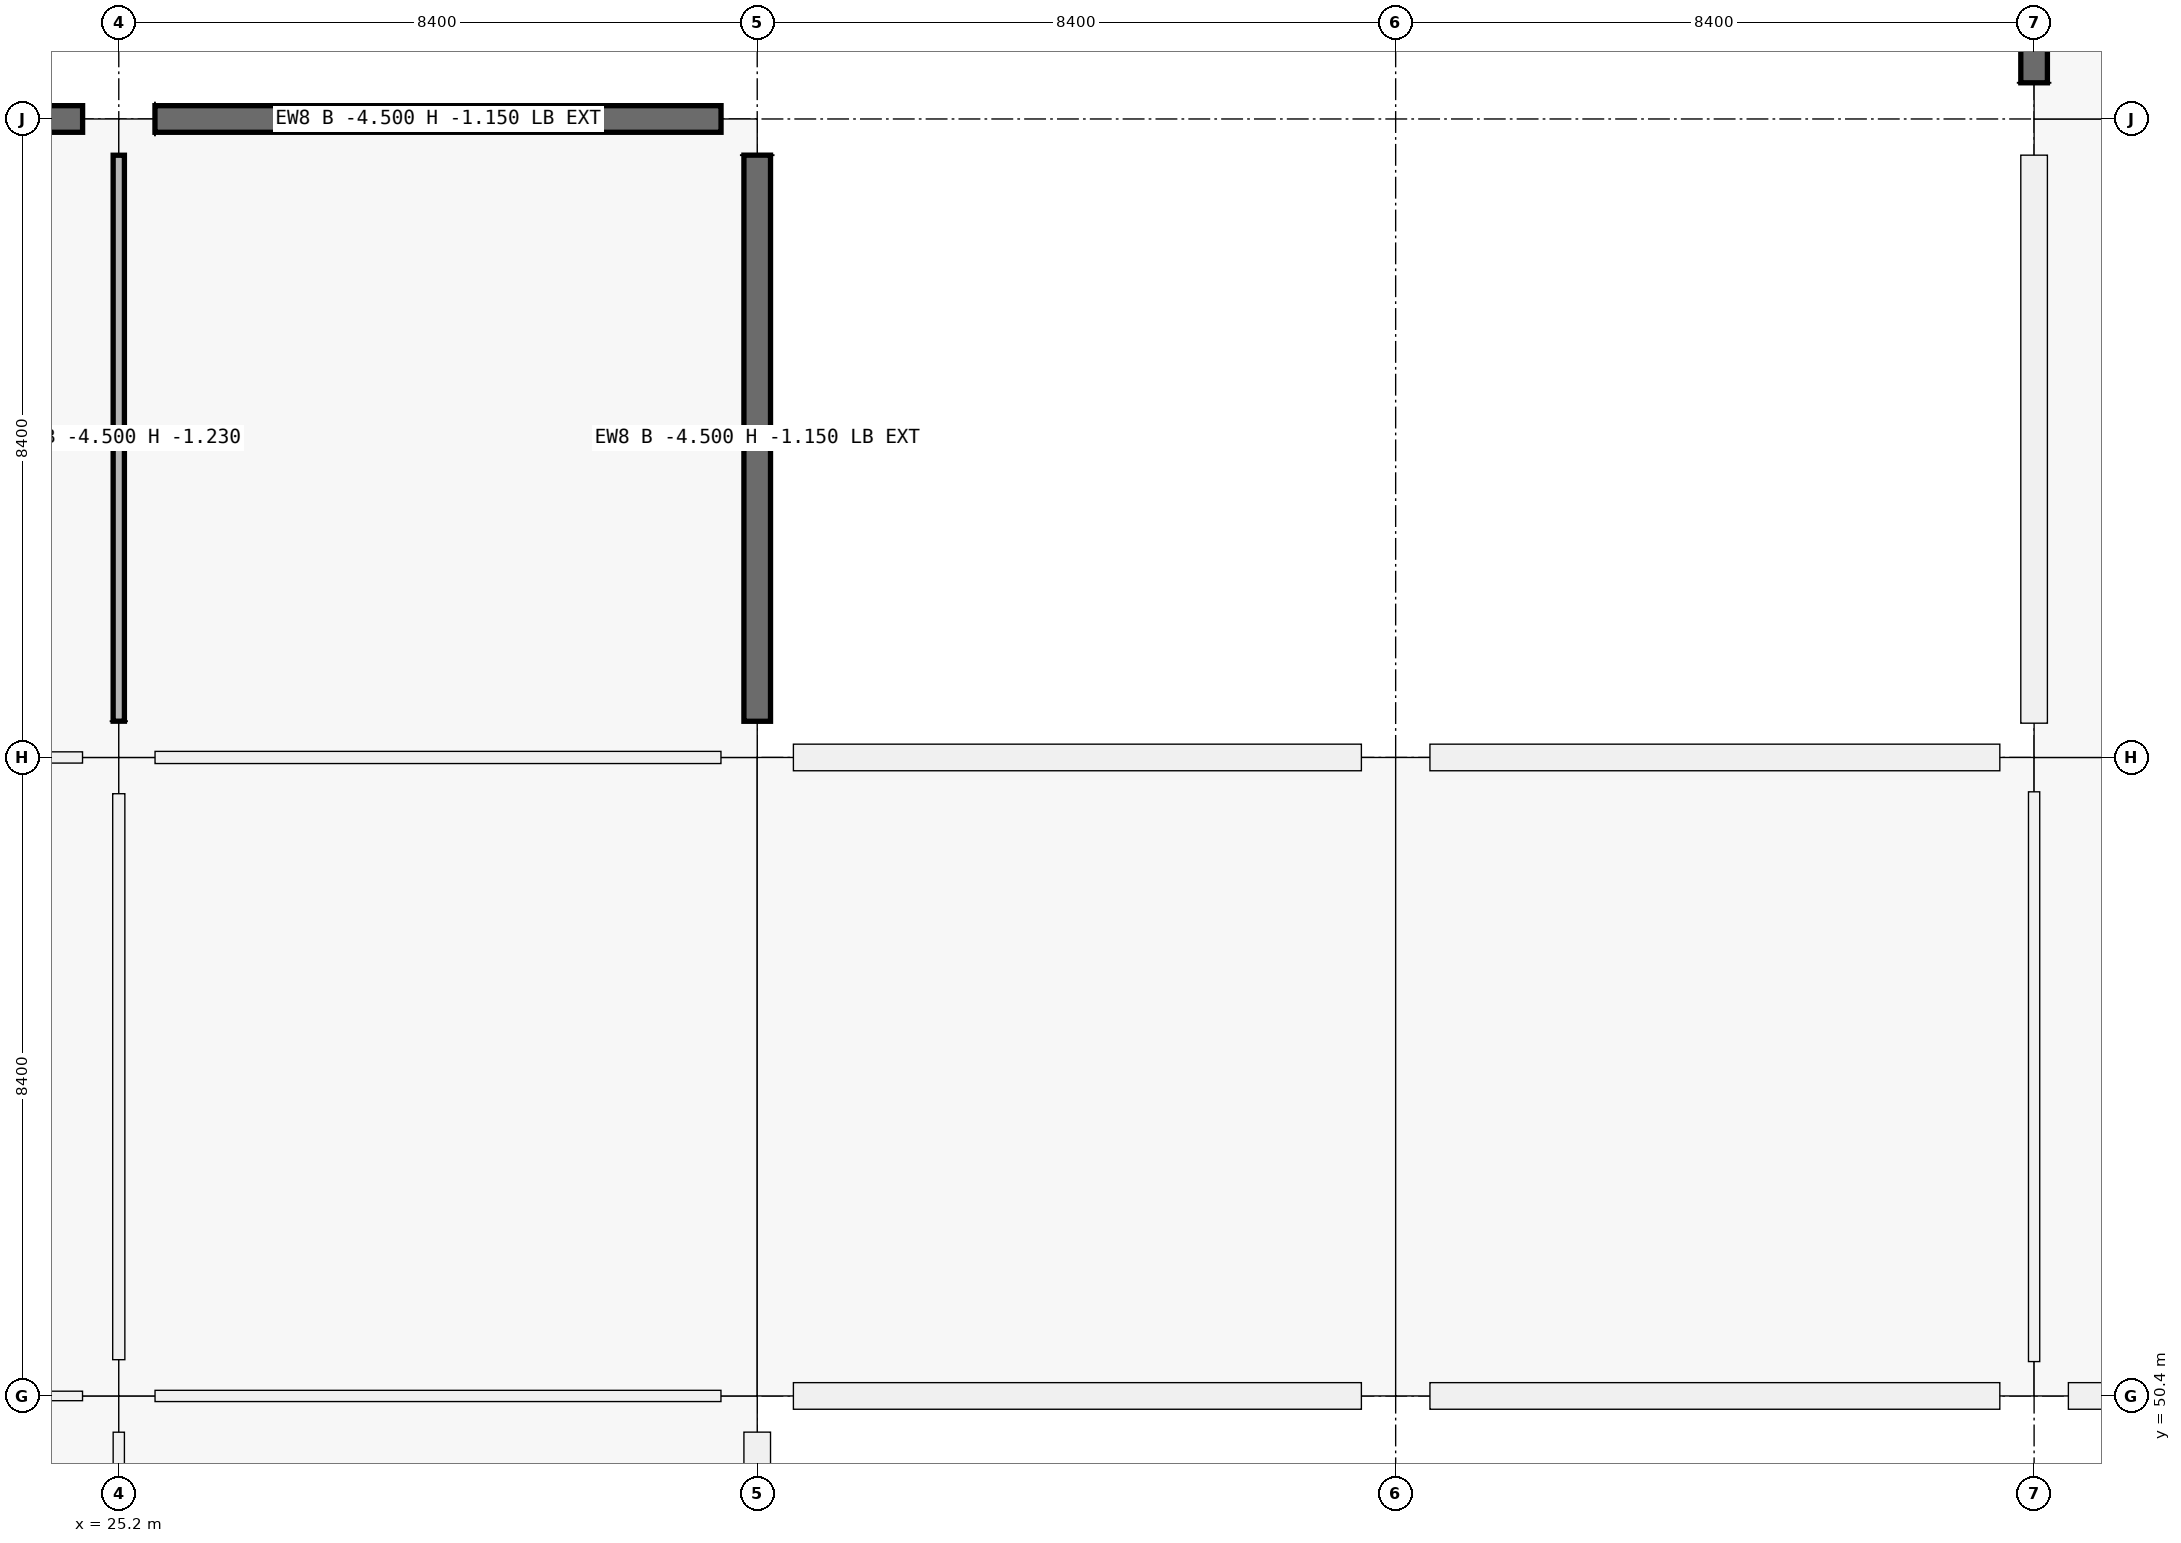
"""IFC4 building model, lengths in metres.
Left out: names, types, materials, properties, quantities, classifications, styles, units other than length and angle.
Written with IfcOpenShell. Run it as: python <this file> out.ifc"""

import sys

from ifc_helpers import new_model, si_unit, direction, frame, frame_2d, origin, origin_2d, place, context, subcontext, project, spatial, rectangle, extrude, element, fill, save


model = new_model("IFC4")
c1 = context("Model", 3, precision=1e-05, world=origin(), true_north=direction((0.0, 1.0)))
c2 = subcontext(c1, "Body", "Model", "MODEL_VIEW")
j1 = project(units=[si_unit("LENGTHUNIT", "METRE"), si_unit("PLANEANGLEUNIT", "RADIAN")], contexts=[c1])
p1 = place(None, origin())
s1 = spatial("IfcSite", under=j1, at=p1, CompositionType="ELEMENT")
p2 = place(p1, origin())
s2 = spatial("IfcBuilding", under=s1, at=p2, CompositionType="ELEMENT")
p3 = place(p2, frame((0.0, 0.0, -4.5)))
s3 = spatial("IfcBuildingStorey", under=s2, at=p3, CompositionType="ELEMENT", Elevation=-4.5)
for number, where, z_axis, x_axis in (
    (1, (25.2, 50.4, -0.35), (0.0, 0.0, 1.0), (1.0, 0.0, 0.0)),
    (2, (25.2, 58.8, -0.35), (0.0, 0.0, 1.0), (1.0, 0.0, 0.0)),
    (3, (25.2, 67.2, -0.35), (0.0, 0.0, 1.0), (1.0, 0.0, 0.0)),
    (4, (33.6, 50.4, -0.35), (0.0, 0.0, 1.0), (1.0, 0.0, 0.0)),
    (5, (33.6, 58.8, -0.35), (0.0, 0.0, 1.0), (1.0, 0.0, 0.0)),
    (6, (33.6, 67.2, -0.35), (0.0, 0.0, 1.0), (1.0, 0.0, 0.0)),
):
    element("IfcColumn", number, at=place(p3, frame(where, z_axis=z_axis, x_axis=x_axis)), inside=s3, PredefinedType="COLUMN", context=c2, shape_type="SweptSolid", body=[
        extrude(rectangle(XDim=0.95, YDim=0.95, at=origin_2d()), origin(), (0.0, 0.0, 1.0), 4.85),
    ])
for number, where, z_axis, x_axis in (
    (7, (42.0, 50.4, -0.35), (0.0, 0.0, 1.0), (1.0, 0.0, 0.0)),
    (8, (42.0, 58.8, -0.35), (0.0, 0.0, 1.0), (1.0, 0.0, 0.0)),
):
    element("IfcColumn", number, at=place(p3, frame(where, z_axis=z_axis, x_axis=x_axis)), inside=s3, PredefinedType="COLUMN", context=c2, shape_type="SweptSolid", body=[
        extrude(rectangle(XDim=0.9, YDim=0.9, at=origin_2d()), origin(), (0.0, 0.0, 1.0), 4.85),
    ])
p4 = place(p3, frame((42.0, 67.2, -0.35), z_axis=(0.0, 0.0, 1.0), x_axis=(1.0, 0.0, 0.0)))
e9 = element("IfcColumn", 9, at=p4, inside=s3, PredefinedType="COLUMN", context=c2, shape_type="SweptSolid", body=[
    extrude(rectangle(XDim=0.95, YDim=0.95, at=origin_2d()), origin(), (0.0, 0.0, 1.0), 4.85),
])
for number, where, z_axis, x_axis in (
    (10, (50.4, 50.4, -0.35), (0.0, 0.0, 1.0), (1.0, 0.0, 0.0)),
    (11, (50.4, 58.8, -0.35), (0.0, 0.0, 1.0), (1.0, 0.0, 0.0)),
):
    element("IfcColumn", number, at=place(p3, frame(where, z_axis=z_axis, x_axis=x_axis)), inside=s3, PredefinedType="COLUMN", context=c2, shape_type="SweptSolid", body=[
        extrude(rectangle(XDim=0.9, YDim=0.9, at=origin_2d()), origin(), (0.0, 0.0, 1.0), 4.85),
    ])
p5 = place(p3, frame((50.4, 67.2, -0.35), z_axis=(0.0, 0.0, 1.0), x_axis=(1.0, 0.0, 0.0)))
e12 = element("IfcColumn", 12, at=p5, inside=s3, PredefinedType="COLUMN", context=c2, shape_type="SweptSolid", body=[
    extrude(rectangle(XDim=0.95, YDim=0.95, at=origin_2d()), origin(), (0.0, 0.0, 1.0), 4.85),
])
p6 = place(p3, frame((17.276, 67.2, 0.0), z_axis=(0.0, 0.0, 1.0), x_axis=(1.0, 0.0, 0.0)))
e13 = element("IfcWall", 13, at=p6, inside=s3, PredefinedType="SOLIDWALL", context=c2, shape_type="SweptSolid", body=[
    extrude(rectangle(XDim=7.448, YDim=0.35, at=frame_2d((3.724, 0.0))), origin(), (0.0, 0.0, 1.0), 3.35),
])
for number, where, z_axis, x_axis in (
    (14, (33.6, 49.924, 0.0), (0.0, 0.0, 1.0), (0.0, -1.0, 0.0)),
    (15, (25.676, 67.2, 0.0), (0.0, 0.0, 1.0), (1.0, 0.0, 0.0)),
):
    element("IfcWall", number, at=place(p3, frame(where, z_axis=z_axis, x_axis=x_axis)), inside=s3, PredefinedType="SOLIDWALL", context=c2, shape_type="SweptSolid", body=[
        extrude(rectangle(XDim=7.448, YDim=0.35, at=frame_2d((3.724, 0.0))), origin(), (0.0, 0.0, 1.0), 3.35),
    ])
p7 = place(p3, frame((33.6, 66.724, 0.0), z_axis=(0.0, 0.0, 1.0), x_axis=(0.0, -1.0, 0.0)))
e16 = element("IfcWall", 16, at=p7, inside=s3, PredefinedType="SOLIDWALL", context=c2, shape_type="SweptSolid", body=[
    extrude(rectangle(XDim=7.448, YDim=0.35, at=frame_2d((3.724, 0.0))), origin(), (0.0, 0.0, 1.0), 3.35),
])
for number, where, z_axis, x_axis in (
    (17, (41.549, 50.4, 0.0), (0.0, 0.0, 1.0), (-1.0, 0.0, 0.0)),
    (18, (34.076, 58.8, 0.0), (0.0, 0.0, 1.0), (1.0, 0.0, 0.0)),
):
    element("IfcWall", number, at=place(p3, frame(where, z_axis=z_axis, x_axis=x_axis)), inside=s3, PredefinedType="SOLIDWALL", context=c2, shape_type="SweptSolid", body=[
        extrude(rectangle(XDim=7.473, YDim=0.35, at=frame_2d((3.737, 0.0))), origin(), (0.0, 0.0, 1.0), 3.35),
    ])
for number, where, z_axis, x_axis in (
    (19, (49.949, 50.4, 0.0), (0.0, 0.0, 1.0), (-1.0, 0.0, 0.0)),
    (20, (42.451, 58.8, 0.0), (0.0, 0.0, 1.0), (1.0, 0.0, 0.0)),
    (21, (58.349, 50.4, 0.0), (0.0, 0.0, 1.0), (-1.0, 0.0, 0.0)),
):
    element("IfcWall", number, at=place(p3, frame(where, z_axis=z_axis, x_axis=x_axis)), inside=s3, PredefinedType="SOLIDWALL", context=c2, shape_type="SweptSolid", body=[
        extrude(rectangle(XDim=7.498, YDim=0.35, at=frame_2d((3.749, 0.0))), origin(), (0.0, 0.0, 1.0), 3.35),
    ])
p8 = place(p3, frame((50.4, 59.251, 0.0), z_axis=(0.0, 0.0, 1.0), x_axis=(0.0, 1.0, 0.0)))
e22 = element("IfcWall", 22, at=p8, inside=s3, PredefinedType="SOLIDWALL", context=c2, shape_type="SweptSolid", body=[
    extrude(rectangle(XDim=7.473, YDim=0.35, at=frame_2d((3.737, 0.0))), origin(), (0.0, 0.0, 1.0), 3.35),
])
p9 = place(p3, frame((50.4, 67.676, 0.0), z_axis=(0.0, 0.0, 1.0), x_axis=(0.0, 1.0, 0.0)))
e23 = element("IfcWall", 23, at=p9, inside=s3, PredefinedType="SOLIDWALL", context=c2, shape_type="SweptSolid", body=[
    extrude(rectangle(XDim=7.448, YDim=0.35, at=frame_2d((3.724, 0.0))), origin(), (0.0, 0.0, 1.0), 3.35),
])
p10 = place(p3, frame((17.277, 50.4, 0.0), z_axis=(0.0, 0.0, 1.0), x_axis=(1.0, 0.0, 0.0)))
e24 = element("IfcWall", 24, at=p10, inside=s3, PredefinedType="PARTITIONING", context=c2, shape_type="SweptSolid", body=[
    extrude(rectangle(XDim=7.446, YDim=0.125, at=frame_2d((3.723, 0.0))), origin(), (0.0, 0.0, 1.0), 3.27),
])
p11 = place(p10, frame((0.528, 0.0, 0.0)))
e25 = element("IfcOpeningElement", 25, at=p11, cuts=e24, PredefinedType="OPENING", context=c2, shape_type="SweptSolid", body=[
    extrude(rectangle(XDim=0.92, YDim=2.1, at=frame_2d((0.46, 1.05))), frame((0.0, 0.062, 0.0), z_axis=(0.0, -1.0, 0.0), x_axis=(1.0, 0.0, 0.0)), (0.0, 0.0, 1.0), 0.125),
])
p12 = place(p10, frame((4.418, 0.0, 0.0)))
e26 = element("IfcOpeningElement", 26, at=p12, cuts=e24, PredefinedType="OPENING", context=c2, shape_type="SweptSolid", body=[
    extrude(rectangle(XDim=0.98, YDim=2.08, at=frame_2d((0.49, 1.04))), frame((0.0, 0.062, 0.0), z_axis=(0.0, -1.0, 0.0), x_axis=(1.0, 0.0, 0.0)), (0.0, 0.0, 1.0), 0.125),
])
p13 = place(p3, frame((17.277, 58.8, 0.0), z_axis=(0.0, 0.0, 1.0), x_axis=(1.0, 0.0, 0.0)))
e27 = element("IfcWall", 27, at=p13, inside=s3, PredefinedType="PARTITIONING", context=c2, shape_type="SweptSolid", body=[
    extrude(rectangle(XDim=7.446, YDim=0.148, at=frame_2d((3.723, 0.0))), origin(), (0.0, 0.0, 1.0), 3.27),
])
p14 = place(p13, frame((3.173, 0.0, 0.0)))
e28 = element("IfcOpeningElement", 28, at=p14, cuts=e27, PredefinedType="OPENING", context=c2, shape_type="SweptSolid", body=[
    extrude(rectangle(XDim=1.1, YDim=2.15, at=frame_2d((0.55, 1.075))), frame((0.0, 0.074, 0.0), z_axis=(0.0, -1.0, 0.0), x_axis=(1.0, 0.0, 0.0)), (0.0, 0.0, 1.0), 0.148),
])
p15 = place(p3, frame((25.677, 50.4, 0.0), z_axis=(0.0, 0.0, 1.0), x_axis=(1.0, 0.0, 0.0)))
e29 = element("IfcWall", 29, at=p15, inside=s3, PredefinedType="PARTITIONING", context=c2, shape_type="SweptSolid", body=[
    extrude(rectangle(XDim=7.446, YDim=0.148, at=frame_2d((3.723, 0.0))), origin(), (0.0, 0.0, 1.0), 3.27),
])
p16 = place(p15, frame((3.223, 0.0, 0.0)))
e30 = element("IfcOpeningElement", 30, at=p16, cuts=e29, PredefinedType="OPENING", context=c2, shape_type="SweptSolid", body=[
    extrude(rectangle(XDim=1.0, YDim=2.15, at=frame_2d((0.5, 1.075))), frame((0.0, 0.074, 0.0), z_axis=(0.0, -1.0, 0.0), x_axis=(1.0, 0.0, 0.0)), (0.0, 0.0, 1.0), 0.148),
])
p17 = place(p3, frame((25.677, 58.8, 0.0), z_axis=(0.0, 0.0, 1.0), x_axis=(1.0, 0.0, 0.0)))
e31 = element("IfcWall", 31, at=p17, inside=s3, PredefinedType="PARTITIONING", context=c2, shape_type="SweptSolid", body=[
    extrude(rectangle(XDim=7.446, YDim=0.16, at=frame_2d((3.723, 0.0))), origin(), (0.0, 0.0, 1.0), 3.27),
])
p18 = place(p17, frame((3.273, 0.0, 0.0)))
e32 = element("IfcOpeningElement", 32, at=p18, cuts=e31, PredefinedType="OPENING", context=c2, shape_type="SweptSolid", body=[
    extrude(rectangle(XDim=0.9, YDim=2.05, at=frame_2d((0.45, 1.025))), frame((0.0, 0.08, 0.0), z_axis=(0.0, -1.0, 0.0), x_axis=(1.0, 0.0, 0.0)), (0.0, 0.0, 1.0), 0.16),
])
p19 = place(p3, frame((25.2, 42.477, 0.0), z_axis=(0.0, 0.0, 1.0), x_axis=(0.0, 1.0, 0.0)))
e33 = element("IfcWall", 33, at=p19, inside=s3, PredefinedType="PARTITIONING", context=c2, shape_type="SweptSolid", body=[
    extrude(rectangle(XDim=7.446, YDim=0.148, at=frame_2d((3.723, 0.0))), origin(), (0.0, 0.0, 1.0), 3.27),
])
p20 = place(p3, frame((25.2, 50.877, 0.0), z_axis=(0.0, 0.0, 1.0), x_axis=(0.0, 1.0, 0.0)))
e34 = element("IfcWall", 34, at=p20, inside=s3, PredefinedType="PARTITIONING", context=c2, shape_type="SweptSolid", body=[
    extrude(rectangle(XDim=7.446, YDim=0.16, at=frame_2d((3.723, 0.0))), origin(), (0.0, 0.0, 1.0), 3.27),
])
p21 = place(p20, frame((3.148, 0.0, 0.0)))
e35 = element("IfcOpeningElement", 35, at=p21, cuts=e34, PredefinedType="OPENING", context=c2, shape_type="SweptSolid", body=[
    extrude(rectangle(XDim=1.15, YDim=2.2, at=frame_2d((0.575, 1.1))), frame((0.0, 0.08, 0.0), z_axis=(0.0, -1.0, 0.0), x_axis=(1.0, 0.0, 0.0)), (0.0, 0.0, 1.0), 0.16),
])
p22 = place(p3, frame((25.2, 59.277, 0.0), z_axis=(0.0, 0.0, 1.0), x_axis=(0.0, 1.0, 0.0)))
e36 = element("IfcWall", 36, at=p22, inside=s3, PredefinedType="PARTITIONING", context=c2, shape_type="SweptSolid", body=[
    extrude(rectangle(XDim=7.446, YDim=0.148, at=frame_2d((3.723, 0.0))), origin(), (0.0, 0.0, 1.0), 3.27),
])
p23 = place(p3, frame((50.4, 50.852, 0.0), z_axis=(0.0, 0.0, 1.0), x_axis=(0.0, 1.0, 0.0)))
e37 = element("IfcWall", 37, at=p23, inside=s3, PredefinedType="PARTITIONING", context=c2, shape_type="SweptSolid", body=[
    extrude(rectangle(XDim=7.496, YDim=0.148, at=frame_2d((3.748, 0.0))), origin(), (0.0, 0.0, 1.0), 3.27),
])
p24 = place(p23, frame((3.198, 0.0, 0.0)))
e38 = element("IfcOpeningElement", 38, at=p24, cuts=e37, PredefinedType="OPENING", context=c2, shape_type="SweptSolid", body=[
    extrude(rectangle(XDim=1.1, YDim=2.15, at=frame_2d((0.55, 1.075))), frame((0.0, 0.074, 0.0), z_axis=(0.0, -1.0, 0.0), x_axis=(1.0, 0.0, 0.0)), (0.0, 0.0, 1.0), 0.148),
])
p25 = place(p21, origin())
e39 = element("IfcDoor", 39, at=p25, inside=s3, OperationType="SINGLE_SWING_RIGHT", PredefinedType="DOOR", context=c2, shape_type="SweptSolid", body=[
    extrude(rectangle(XDim=1.15, YDim=2.2, at=frame_2d((0.575, 1.1))), frame((0.0, 0.025, 0.0), z_axis=(0.0, -1.0, 0.0), x_axis=(1.0, 0.0, 0.0)), (0.0, 0.0, 1.0), 0.05),
])
fill(e35, e39)
p26 = place(p24, origin())
e40 = element("IfcDoor", 40, at=p26, inside=s3, OperationType="SINGLE_SWING_LEFT", PredefinedType="DOOR", context=c2, shape_type="SweptSolid", body=[
    extrude(rectangle(XDim=1.1, YDim=2.15, at=frame_2d((0.55, 1.075))), frame((0.0, 0.025, 0.0), z_axis=(0.0, -1.0, 0.0), x_axis=(1.0, 0.0, 0.0)), (0.0, 0.0, 1.0), 0.05),
])
fill(e38, e40)
p27 = place(p16, origin())
e41 = element("IfcDoor", 41, at=p27, inside=s3, OperationType="SINGLE_SWING_LEFT", PredefinedType="DOOR", context=c2, shape_type="SweptSolid", body=[
    extrude(rectangle(XDim=1.0, YDim=2.15, at=frame_2d((0.5, 1.075))), frame((0.0, 0.025, 0.0), z_axis=(0.0, -1.0, 0.0), x_axis=(1.0, 0.0, 0.0)), (0.0, 0.0, 1.0), 0.05),
])
fill(e30, e41)
p28 = place(p18, origin())
e42 = element("IfcDoor", 42, at=p28, inside=s3, OperationType="SINGLE_SWING_RIGHT", PredefinedType="DOOR", context=c2, shape_type="SweptSolid", body=[
    extrude(rectangle(XDim=0.9, YDim=2.05, at=frame_2d((0.45, 1.025))), frame((0.0, 0.025, 0.0), z_axis=(0.0, -1.0, 0.0), x_axis=(1.0, 0.0, 0.0)), (0.0, 0.0, 1.0), 0.05),
])
fill(e32, e42)
save(model, sys.argv[1])
